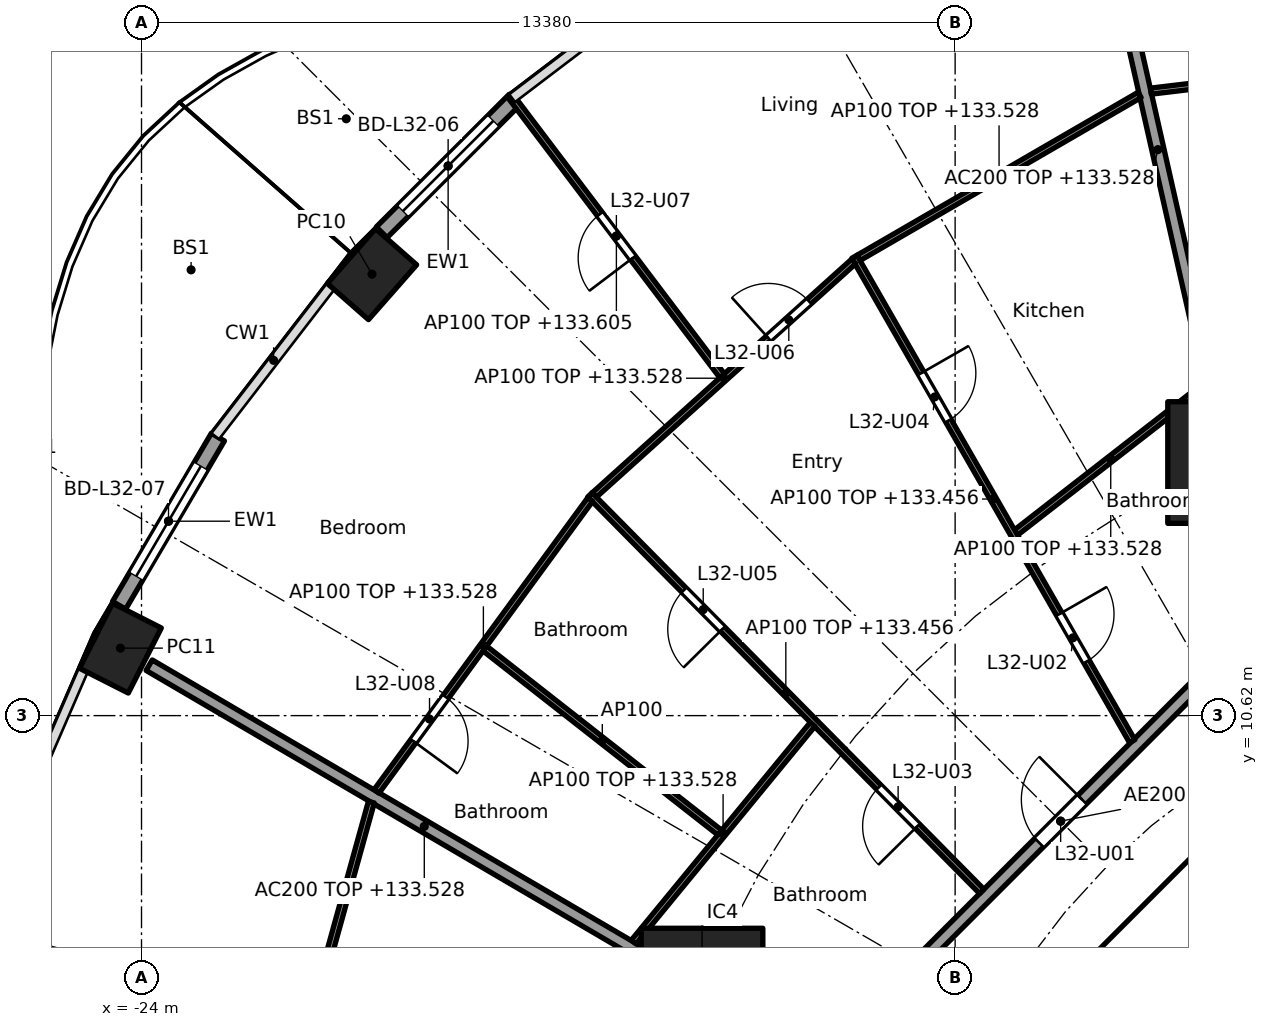
"""IFC4 building model, lengths in metres.
Left out: names, types, materials, properties, quantities, classifications, styles, units other than length and angle.
Written with IfcOpenShell. Run it as: python <this file> out.ifc"""

import sys

from ifc_helpers import new_model, si_unit, direction, frame, frame_2d, origin, origin_2d, place, context, subcontext, project, spatial, rectangle, hollow_rectangle, extrude, element, fill, save


model = new_model("IFC4")
c1 = context("Model", 3, precision=1e-05, world=origin(), true_north=direction((0.0, 1.0)))
c2 = subcontext(c1, "Body", "Model", "MODEL_VIEW")
j1 = project(units=[si_unit("LENGTHUNIT", "METRE"), si_unit("PLANEANGLEUNIT", "RADIAN")], contexts=[c1])
p1 = place(None, origin())
s1 = spatial("IfcSite", under=j1, at=p1, CompositionType="ELEMENT")
p2 = place(p1, origin())
s2 = spatial("IfcBuilding", under=s1, at=p2, CompositionType="ELEMENT")
p3 = place(p2, frame((0.0, 0.0, 130.7)))
s3 = spatial("IfcBuildingStorey", under=s2, at=p3, CompositionType="ELEMENT", Elevation=130.7)
for number, where, z_axis, x_axis in (
    (1, (-20.209, 17.88, 0.0), (0.0, 0.0, 1.0), (-0.66, -0.751, 0.0)),
    (2, (-24.347, 11.73, 0.0), (0.0, 0.0, 1.0), (-0.452, -0.892, 0.0)),
):
    element("IfcColumn", number, at=place(p3, frame(where, z_axis=z_axis, x_axis=x_axis)), inside=s3, PredefinedType="COLUMN", context=c2, shape_type="SweptSolid", body=[
        extrude(hollow_rectangle(XDim=1.2, YDim=0.9, WallThickness=0.04, at=origin_2d()), origin(), (0.0, 0.0, 1.0), 3.7),
    ])
for number, where, z_axis, x_axis in (
    (3, (-6.123, 14.782, 0.0), (0.0, 0.0, 1.0), (1.0, 0.0, 0.0)),
    (4, (-14.782, 6.123, 0.0), (0.0, 0.0, 1.0), (1.0, 0.0, 0.0)),
):
    element("IfcColumn", number, at=place(p3, frame(where, z_axis=z_axis, x_axis=x_axis)), inside=s3, PredefinedType="COLUMN", context=c2, shape_type="SweptSolid", body=[
        extrude(rectangle(XDim=2.0, YDim=2.0, at=origin_2d()), origin(), (0.0, 0.0, 1.0), 3.7),
    ])
p4 = place(p3, frame((-20.05, 18.569, 0.0), z_axis=(0.0, 0.0, 1.0), x_axis=(0.707857823335, 0.706354940482, 0.0)))
e5 = element("IfcWall", 5, at=p4, inside=s3, PredefinedType="SOLIDWALL", context=c2, shape_type="SweptSolid", body=[
    extrude(rectangle(XDim=3.086, YDim=0.25, at=frame_2d((1.543, 0.0))), origin(), (0.0, 0.0, 1.0), 3.44),
])
p5 = place(p4, frame((0.493, 0.0, 0.0)))
e6 = element("IfcOpeningElement", 6, at=p5, cuts=e5, PredefinedType="OPENING", context=c2, shape_type="SweptSolid", body=[
    extrude(rectangle(XDim=2.1, YDim=2.4, at=frame_2d((1.05, 1.2))), frame((0.0, 0.135, 0.0), z_axis=(0.0, -1.0, 0.0), x_axis=(1.0, 0.0, 0.0)), (0.0, 0.0, 1.0), 0.27),
])
p6 = place(p3, frame((-24.368, 12.434, 0.0), z_axis=(0.0, 0.0, 1.0), x_axis=(0.506314982873, 0.862348617508, 0.0)))
e7 = element("IfcWall", 7, at=p6, inside=s3, PredefinedType="SOLIDWALL", context=c2, shape_type="SweptSolid", body=[
    extrude(rectangle(XDim=3.208, YDim=0.25, at=frame_2d((1.604, 0.0))), origin(), (0.0, 0.0, 1.0), 3.44),
])
p7 = place(p6, frame((0.554, 0.0, 0.0)))
e8 = element("IfcOpeningElement", 8, at=p7, cuts=e7, PredefinedType="OPENING", context=c2, shape_type="SweptSolid", body=[
    extrude(rectangle(XDim=2.1, YDim=2.4, at=frame_2d((1.05, 1.2))), frame((0.0, 0.135, 0.0), z_axis=(0.0, -1.0, 0.0), x_axis=(1.0, 0.0, 0.0)), (0.0, 0.0, 1.0), 0.27),
])
p8 = place(p3, frame((-4.613, 9.988, 0.0), z_axis=(0.0, 0.0, 1.0), x_axis=(-0.707106781187, -0.707106781187, 0.0)))
e9 = element("IfcWall", 9, at=p8, inside=s3, PredefinedType="SHEAR", context=c2, shape_type="SweptSolid", body=[
    extrude(rectangle(XDim=7.602, YDim=0.6, at=frame_2d((3.801, 0.0))), origin(), (0.0, 0.0, 1.0), 3.44),
])
p9 = place(p8, frame((0.351, 0.0, 0.0)))
e10 = element("IfcOpeningElement", 10, at=p9, cuts=e9, PredefinedType="OPENING", context=c2, shape_type="SweptSolid", body=[
    extrude(rectangle(XDim=1.1, YDim=2.1, at=frame_2d((0.55, 1.05))), frame((0.0, 0.31, 0.0), z_axis=(0.0, -1.0, 0.0), x_axis=(1.0, 0.0, 0.0)), (0.0, 0.0, 1.0), 0.62),
])
p10 = place(p3, frame((-6.134, 14.831, 0.0), z_axis=(0.0, 0.0, 1.0), x_axis=(-0.220337590808, 0.975423675167, 0.0)))
e11 = element("IfcWall", 11, at=p10, inside=s3, PredefinedType="PARTITIONING", context=c2, shape_type="SweptSolid", body=[
    extrude(rectangle(XDim=10.451, YDim=0.2, at=frame_2d((5.226, 0.0))), origin(), (0.0, 0.0, 1.0), 2.828),
])
p11 = place(p3, frame((-14.825, 6.148, 0.0), z_axis=(0.0, 0.0, 1.0), x_axis=(-0.862852031662, 0.505456597006, 0.0)))
e12 = element("IfcWall", 12, at=p11, inside=s3, PredefinedType="PARTITIONING", context=c2, shape_type="SweptSolid", body=[
    extrude(rectangle(XDim=10.487, YDim=0.2, at=frame_2d((5.244, 0.0))), origin(), (0.0, 0.0, 1.0), 2.828),
])
p12 = place(p3, frame((-5.275, 12.494, 0.0), z_axis=(0.0, 0.0, 1.0), x_axis=(-0.707106781187, -0.707106781187, 0.0)))
e13 = element("IfcWall", 13, at=p12, inside=s3, PredefinedType="PARTITIONING", context=c2, shape_type="SweptSolid", body=[
    extrude(rectangle(XDim=10.209, YDim=0.2, at=frame_2d((5.104, 0.0))), origin(), (0.0, 0.0, 1.0), 3.44),
])
p13 = place(p12, frame((4.604, 0.0, 0.0)))
e14 = element("IfcOpeningElement", 14, at=p13, cuts=e13, PredefinedType="OPENING", context=c2, shape_type="SweptSolid", body=[
    extrude(rectangle(XDim=1.0, YDim=2.1, at=frame_2d((0.5, 1.05))), frame((0.0, 0.11, 0.0), z_axis=(0.0, -1.0, 0.0), x_axis=(1.0, 0.0, 0.0)), (0.0, 0.0, 1.0), 0.22),
])
p14 = place(p3, frame((-1.825, 21.557, 0.0), z_axis=(0.0, 0.0, 1.0), x_axis=(-0.992915053711, -0.11882632753, 0.0)))
e15 = element("IfcWall", 15, at=p14, inside=s3, PredefinedType="PARTITIONING", context=c2, shape_type="SweptSolid", body=[
    extrude(rectangle(XDim=5.615, YDim=0.1, at=frame_2d((2.808, 0.0))), origin(), (0.0, 0.0, 1.0), 2.828),
])
p15 = place(p14, frame((2.358, 0.0, 0.0)))
e16 = element("IfcOpeningElement", 16, at=p15, cuts=e15, PredefinedType="OPENING", context=c2, shape_type="SweptSolid", body=[
    extrude(rectangle(XDim=0.9, YDim=2.1, at=frame_2d((0.45, 1.05))), frame((0.0, 0.06, 0.0), z_axis=(0.0, -1.0, 0.0), x_axis=(1.0, 0.0, 0.0)), (0.0, 0.0, 1.0), 0.12),
])
p16 = place(p3, frame((-6.503, 16.054, 0.0), z_axis=(0.0, 0.0, 1.0), x_axis=(-0.789428807693, -0.613842127574, 0.0)))
e17 = element("IfcWall", 17, at=p16, inside=s3, PredefinedType="PARTITIONING", context=c2, shape_type="SweptSolid", body=[
    extrude(rectangle(XDim=3.948, YDim=0.1, at=frame_2d((1.974, 0.0))), origin(), (0.0, 0.0, 1.0), 2.828),
])
p17 = place(p3, frame((-7.586, 20.827, 0.0), z_axis=(0.0, 0.0, 1.0), x_axis=(-0.865093450578, -0.501610727325, 0.0)))
e18 = element("IfcWall", 18, at=p17, inside=s3, PredefinedType="PARTITIONING", context=c2, shape_type="SweptSolid", body=[
    extrude(rectangle(XDim=5.343, YDim=0.1, at=frame_2d((2.671, 0.0))), origin(), (0.0, 0.0, 1.0), 2.828),
])
p18 = place(p3, frame((-7.708, 10.198, 0.0), z_axis=(0.0, 0.0, 1.0), x_axis=(-0.497449462689, 0.867492957937, 0.0)))
e19 = element("IfcWall", 19, at=p18, inside=s3, PredefinedType="PARTITIONING", context=c2, shape_type="SweptSolid", body=[
    extrude(rectangle(XDim=9.185, YDim=0.1, at=frame_2d((4.592, 0.0))), origin(), (0.0, 0.0, 1.0), 2.756),
])
p19 = place(p18, frame((1.511, 0.0, 0.0)))
e20 = element("IfcOpeningElement", 20, at=p19, cuts=e19, PredefinedType="OPENING", context=c2, shape_type="SweptSolid", body=[
    extrude(rectangle(XDim=0.9, YDim=2.1, at=frame_2d((0.45, 1.05))), frame((0.0, 0.06, 0.0), z_axis=(0.0, -1.0, 0.0), x_axis=(1.0, 0.0, 0.0)), (0.0, 0.0, 1.0), 0.12),
])
p20 = place(p18, frame((6.078, 0.0, 0.0)))
e21 = element("IfcOpeningElement", 21, at=p20, cuts=e19, PredefinedType="OPENING", context=c2, shape_type="SweptSolid", body=[
    extrude(rectangle(XDim=0.9, YDim=2.1, at=frame_2d((0.45, 1.05))), frame((0.0, 0.06, 0.0), z_axis=(0.0, -1.0, 0.0), x_axis=(1.0, 0.0, 0.0)), (0.0, 0.0, 1.0), 0.12),
])
p21 = place(p3, frame((-12.289, 18.089, 0.0), z_axis=(0.0, 0.0, 1.0), x_axis=(-0.743146066164, -0.669129228435, 0.0)))
e22 = element("IfcWall", 22, at=p21, inside=s3, PredefinedType="PARTITIONING", context=c2, shape_type="SweptSolid", body=[
    extrude(rectangle(XDim=5.739, YDim=0.1, at=frame_2d((2.87, 0.0))), origin(), (0.0, 0.0, 1.0), 2.828),
])
p22 = place(p21, frame((0.985, 0.0, 0.0)))
e23 = element("IfcOpeningElement", 23, at=p22, cuts=e22, PredefinedType="OPENING", context=c2, shape_type="SweptSolid", body=[
    extrude(rectangle(XDim=0.9, YDim=2.1, at=frame_2d((0.45, 1.05))), frame((0.0, 0.06, 0.0), z_axis=(0.0, -1.0, 0.0), x_axis=(1.0, 0.0, 0.0)), (0.0, 0.0, 1.0), 0.12),
])
p23 = place(p3, frame((-14.452, 16.208, 0.0), z_axis=(0.0, 0.0, 1.0), x_axis=(-0.603267974074, 0.797538557975, 0.0)))
e24 = element("IfcWall", 24, at=p23, inside=s3, PredefinedType="PARTITIONING", context=c2, shape_type="SweptSolid", body=[
    extrude(rectangle(XDim=5.764, YDim=0.1, at=frame_2d((2.882, 0.0))), origin(), (0.0, 0.0, 1.0), 2.905),
])
p24 = place(p23, frame((2.432, 0.0, 0.0)))
e25 = element("IfcOpeningElement", 25, at=p24, cuts=e24, PredefinedType="OPENING", context=c2, shape_type="SweptSolid", body=[
    extrude(rectangle(XDim=0.9, YDim=2.1, at=frame_2d((0.45, 1.05))), frame((0.0, 0.06, 0.0), z_axis=(0.0, -1.0, 0.0), x_axis=(1.0, 0.0, 0.0)), (0.0, 0.0, 1.0), 0.12),
])
p25 = place(p3, frame((-10.182, 7.729, 0.0), z_axis=(0.0, 0.0, 1.0), x_axis=(-0.702927211734, 0.711261790766, 0.0)))
e26 = element("IfcWall", 26, at=p25, inside=s3, PredefinedType="PARTITIONING", context=c2, shape_type="SweptSolid", body=[
    extrude(rectangle(XDim=9.168, YDim=0.1, at=frame_2d((4.584, 0.0))), origin(), (0.0, 0.0, 1.0), 2.756),
])
p26 = place(p25, frame((1.507, 0.0, 0.0)))
e27 = element("IfcOpeningElement", 27, at=p26, cuts=e26, PredefinedType="OPENING", context=c2, shape_type="SweptSolid", body=[
    extrude(rectangle(XDim=0.9, YDim=2.1, at=frame_2d((0.45, 1.05))), frame((0.0, 0.06, 0.0), z_axis=(0.0, -1.0, 0.0), x_axis=(1.0, 0.0, 0.0)), (0.0, 0.0, 1.0), 0.12),
])
p27 = place(p25, frame((6.067, 0.0, 0.0)))
e28 = element("IfcOpeningElement", 28, at=p27, cuts=e26, PredefinedType="OPENING", context=c2, shape_type="SweptSolid", body=[
    extrude(rectangle(XDim=0.9, YDim=2.1, at=frame_2d((0.45, 1.05))), frame((0.0, 0.06, 0.0), z_axis=(0.0, -1.0, 0.0), x_axis=(1.0, 0.0, 0.0)), (0.0, 0.0, 1.0), 0.12),
])
p28 = place(p3, frame((-12.965, 10.475, 0.0), z_axis=(0.0, 0.0, 1.0), x_axis=(-0.634943961338, -0.772558195841, 0.0)))
e29 = element("IfcWall", 29, at=p28, inside=s3, PredefinedType="PARTITIONING", context=c2, shape_type="SweptSolid", body=[
    extrude(rectangle(XDim=4.632, YDim=0.1, at=frame_2d((2.316, 0.0))), origin(), (0.0, 0.0, 1.0), 2.828),
])
p29 = place(p3, frame((-16.621, 14.174, 0.0), z_axis=(0.0, 0.0, 1.0), x_axis=(-0.590674917338, -0.806909624449, 0.0)))
e30 = element("IfcWall", 30, at=p29, inside=s3, PredefinedType="PARTITIONING", context=c2, shape_type="SweptSolid", body=[
    extrude(rectangle(XDim=5.949, YDim=0.1, at=frame_2d((2.975, 0.0))), origin(), (0.0, 0.0, 1.0), 2.828),
])
p30 = place(p29, frame((4.024, 0.0, 0.0)))
e31 = element("IfcOpeningElement", 31, at=p30, cuts=e30, PredefinedType="OPENING", context=c2, shape_type="SweptSolid", body=[
    extrude(rectangle(XDim=0.9, YDim=2.1, at=frame_2d((0.45, 1.05))), frame((0.0, 0.06, 0.0), z_axis=(0.0, -1.0, 0.0), x_axis=(1.0, 0.0, 0.0)), (0.0, 0.0, 1.0), 0.12),
])
p31 = place(p3, frame((-14.491, 8.697, 0.0), z_axis=(0.0, 0.0, 1.0), x_axis=(-0.787139479951, 0.616775031193, 0.0)))
e32 = element("IfcWall", 32, at=p31, inside=s3, PredefinedType="PARTITIONING", context=c2, shape_type="SweptSolid", body=[
    extrude(rectangle(XDim=4.907, YDim=0.1, at=frame_2d((2.453, 0.0))), origin(), (0.0, 0.0, 1.0), 3.44),
])
p32 = place(p3, frame((-20.221, 9.197, 0.0), z_axis=(0.0, 0.0, 1.0), x_axis=(-0.267398009191, -0.963586168789, 0.0)))
e33 = element("IfcWall", 33, at=p32, inside=s3, PredefinedType="PARTITIONING", context=c2, shape_type="SweptSolid", body=[
    extrude(rectangle(XDim=5.788, YDim=0.1, at=frame_2d((2.894, 0.0))), origin(), (0.0, 0.0, 1.0), 2.828),
])
p33 = place(p5, origin())
e34 = element("IfcDoor", 34, at=p33, inside=s3, OperationType="SLIDING_TO_LEFT", PredefinedType="DOOR", context=c2, shape_type="SweptSolid", body=[
    extrude(rectangle(XDim=2.1, YDim=2.4, at=frame_2d((1.05, 1.2))), frame((0.0, 0.025, 0.0), z_axis=(0.0, -1.0, 0.0), x_axis=(1.0, 0.0, 0.0)), (0.0, 0.0, 1.0), 0.05),
])
fill(e6, e34)
p34 = place(p7, origin())
e35 = element("IfcDoor", 35, at=p34, inside=s3, OperationType="SLIDING_TO_LEFT", PredefinedType="DOOR", context=c2, shape_type="SweptSolid", body=[
    extrude(rectangle(XDim=2.1, YDim=2.4, at=frame_2d((1.05, 1.2))), frame((0.0, 0.025, 0.0), z_axis=(0.0, -1.0, 0.0), x_axis=(1.0, 0.0, 0.0)), (0.0, 0.0, 1.0), 0.05),
])
fill(e8, e35)
p35 = place(p13, frame((1.0, 0.0, 0.0), x_axis=(-1.0, 0.0, 0.0)))
e36 = element("IfcDoor", 36, at=p35, inside=s3, OperationType="SINGLE_SWING_RIGHT", PredefinedType="DOOR", context=c2, shape_type="SweptSolid", body=[
    extrude(rectangle(XDim=1.0, YDim=2.1, at=frame_2d((0.5, 1.05))), frame((0.0, 0.025, 0.0), z_axis=(0.0, -1.0, 0.0), x_axis=(1.0, 0.0, 0.0)), (0.0, 0.0, 1.0), 0.05),
])
fill(e14, e36)
p36 = place(p19, frame((0.9, 0.0, 0.0), x_axis=(-1.0, 0.0, 0.0)))
e37 = element("IfcDoor", 37, at=p36, inside=s3, OperationType="SINGLE_SWING_LEFT", PredefinedType="DOOR", context=c2, shape_type="SweptSolid", body=[
    extrude(rectangle(XDim=0.9, YDim=2.1, at=frame_2d((0.45, 1.05))), frame((0.0, 0.025, 0.0), z_axis=(0.0, -1.0, 0.0), x_axis=(1.0, 0.0, 0.0)), (0.0, 0.0, 1.0), 0.05),
])
fill(e20, e37)
p37 = place(p26, origin())
e38 = element("IfcDoor", 38, at=p37, inside=s3, OperationType="SINGLE_SWING_LEFT", PredefinedType="DOOR", context=c2, shape_type="SweptSolid", body=[
    extrude(rectangle(XDim=0.9, YDim=2.1, at=frame_2d((0.45, 1.05))), frame((0.0, 0.025, 0.0), z_axis=(0.0, -1.0, 0.0), x_axis=(1.0, 0.0, 0.0)), (0.0, 0.0, 1.0), 0.05),
])
fill(e27, e38)
p38 = place(p20, frame((0.9, 0.0, 0.0), x_axis=(-1.0, 0.0, 0.0)))
e39 = element("IfcDoor", 39, at=p38, inside=s3, OperationType="SINGLE_SWING_LEFT", PredefinedType="DOOR", context=c2, shape_type="SweptSolid", body=[
    extrude(rectangle(XDim=0.9, YDim=2.1, at=frame_2d((0.45, 1.05))), frame((0.0, 0.025, 0.0), z_axis=(0.0, -1.0, 0.0), x_axis=(1.0, 0.0, 0.0)), (0.0, 0.0, 1.0), 0.05),
])
fill(e21, e39)
p39 = place(p27, origin())
e40 = element("IfcDoor", 40, at=p39, inside=s3, OperationType="SINGLE_SWING_LEFT", PredefinedType="DOOR", context=c2, shape_type="SweptSolid", body=[
    extrude(rectangle(XDim=0.9, YDim=2.1, at=frame_2d((0.45, 1.05))), frame((0.0, 0.025, 0.0), z_axis=(0.0, -1.0, 0.0), x_axis=(1.0, 0.0, 0.0)), (0.0, 0.0, 1.0), 0.05),
])
fill(e28, e40)
p40 = place(p22, frame((0.9, 0.0, 0.0), x_axis=(-1.0, 0.0, 0.0)))
e41 = element("IfcDoor", 41, at=p40, inside=s3, OperationType="SINGLE_SWING_LEFT", PredefinedType="DOOR", context=c2, shape_type="SweptSolid", body=[
    extrude(rectangle(XDim=0.9, YDim=2.1, at=frame_2d((0.45, 1.05))), frame((0.0, 0.025, 0.0), z_axis=(0.0, -1.0, 0.0), x_axis=(1.0, 0.0, 0.0)), (0.0, 0.0, 1.0), 0.05),
])
fill(e23, e41)
p41 = place(p24, origin())
e42 = element("IfcDoor", 42, at=p41, inside=s3, OperationType="SINGLE_SWING_LEFT", PredefinedType="DOOR", context=c2, shape_type="SweptSolid", body=[
    extrude(rectangle(XDim=0.9, YDim=2.1, at=frame_2d((0.45, 1.05))), frame((0.0, 0.025, 0.0), z_axis=(0.0, -1.0, 0.0), x_axis=(1.0, 0.0, 0.0)), (0.0, 0.0, 1.0), 0.05),
])
fill(e25, e42)
p42 = place(p30, origin())
e43 = element("IfcDoor", 43, at=p42, inside=s3, OperationType="SINGLE_SWING_RIGHT", PredefinedType="DOOR", context=c2, shape_type="SweptSolid", body=[
    extrude(rectangle(XDim=0.9, YDim=2.1, at=frame_2d((0.45, 1.05))), frame((0.0, 0.025, 0.0), z_axis=(0.0, -1.0, 0.0), x_axis=(1.0, 0.0, 0.0)), (0.0, 0.0, 1.0), 0.05),
])
fill(e31, e43)
save(model, sys.argv[1])
